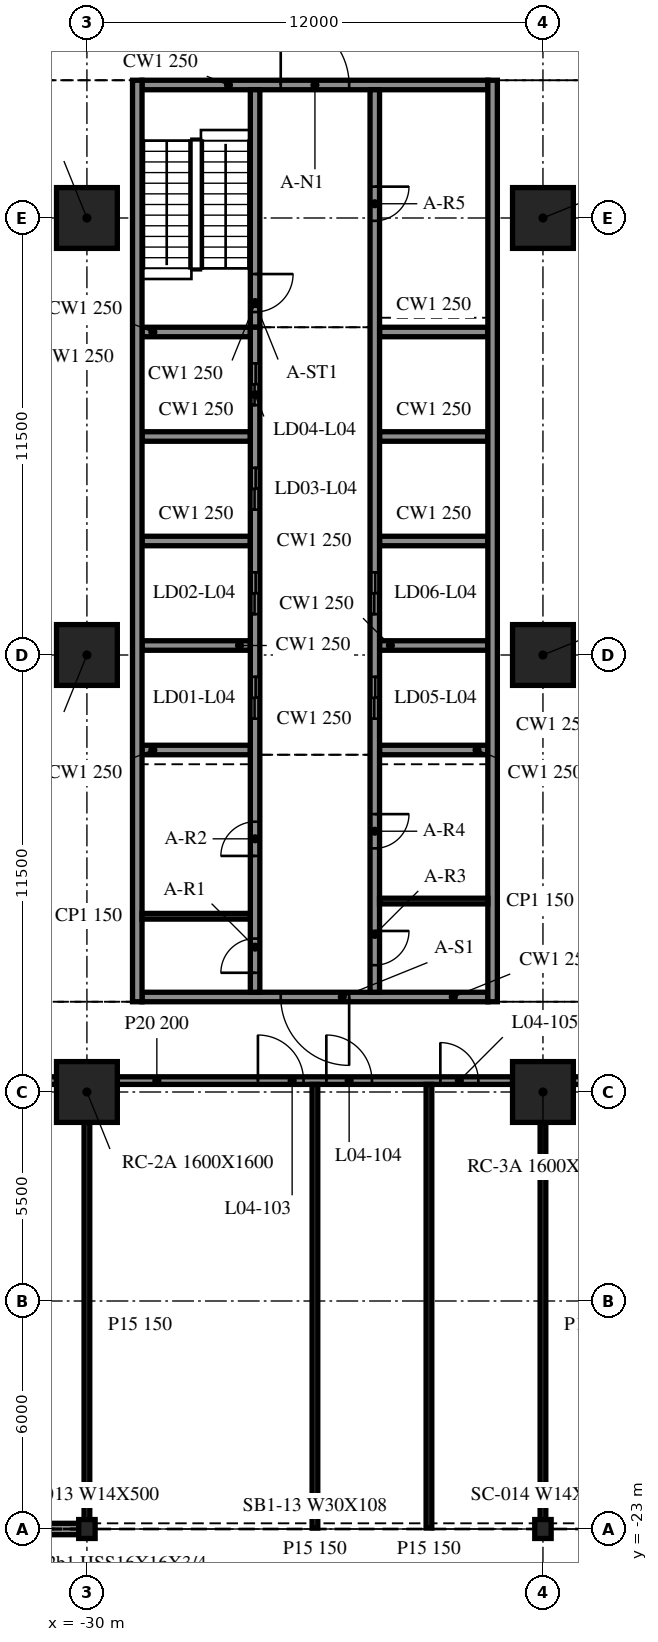
"""IFC4 building model, lengths in metres.
Left out: names, types, materials, properties, quantities, classifications, styles, units other than length and angle.
Written with IfcOpenShell. Run it as: python <this file> out.ifc"""

import sys

from ifc_helpers import new_model, si_unit, direction, frame, frame_2d, origin, origin_2d, place, context, subcontext, project, spatial, rectangle, i_section, extrude, element, fill, save


model = new_model("IFC4")
c1 = context("Model", 3, precision=1e-05, world=origin(), true_north=direction((0.0, 1.0)))
c2 = subcontext(c1, "Body", "Model", "MODEL_VIEW")
j1 = project(units=[si_unit("LENGTHUNIT", "METRE"), si_unit("PLANEANGLEUNIT", "RADIAN")], contexts=[c1])
p1 = place(None, origin())
s1 = spatial("IfcSite", under=j1, at=p1, CompositionType="ELEMENT")
p2 = place(p1, origin())
s2 = spatial("IfcBuilding", under=s1, at=p2, CompositionType="ELEMENT")
p3 = place(p2, frame((0.0, 0.0, 20.1)))
s3 = spatial("IfcBuildingStorey", under=s2, at=p3, CompositionType="ELEMENT", Elevation=20.1)
for number, where, z_axis, x_axis in (
    (1, (-30.0, -11.5, -0.34), (0.0, 0.0, 1.0), (1.0, 0.0, 0.0)),
    (2, (-30.0, 0.0, -0.34), (0.0, 0.0, 1.0), (1.0, 0.0, 0.0)),
    (3, (-30.0, 11.5, -0.34), (0.0, 0.0, 1.0), (1.0, 0.0, 0.0)),
    (4, (-18.0, -11.5, -0.34), (0.0, 0.0, 1.0), (1.0, 0.0, 0.0)),
    (5, (-18.0, 0.0, -0.34), (0.0, 0.0, 1.0), (1.0, 0.0, 0.0)),
    (6, (-18.0, 11.5, -0.34), (0.0, 0.0, 1.0), (1.0, 0.0, 0.0)),
):
    element("IfcColumn", number, at=place(p3, frame(where, z_axis=z_axis, x_axis=x_axis)), inside=s3, PredefinedType="COLUMN", context=c2, shape_type="SweptSolid", body=[
        extrude(rectangle(XDim=1.6, YDim=1.6, at=origin_2d()), origin(), (0.0, 0.0, 1.0), 4.3),
    ])
for number, where, z_axis, x_axis in (
    (7, (-30.0, -23.0, -0.34), (0.0, 0.0, 1.0), (1.0, 0.0, 0.0)),
    (8, (-18.0, -23.0, -0.34), (0.0, 0.0, 1.0), (1.0, 0.0, 0.0)),
):
    element("IfcColumn", number, at=place(p3, frame(where, z_axis=z_axis, x_axis=x_axis)), inside=s3, PredefinedType="COLUMN", context=c2, shape_type="SweptSolid", body=[
        extrude(i_section(OverallWidth=0.432, OverallDepth=0.498, WebThickness=0.056, FlangeThickness=0.089, at=origin_2d()), origin(), (0.0, 0.0, 1.0), 4.3),
    ])
p4 = place(p3, frame((-41.972, -23.0, 0.0), z_axis=(0.0, 0.0, 1.0), x_axis=(1.0, 0.0, 0.0)))
e9 = element("IfcWall", 9, at=p4, inside=s3, PredefinedType="NOTDEFINED", context=c2, shape_type="SweptSolid", body=[
    extrude(rectangle(XDim=11.944, YDim=0.3, at=frame_2d((5.972, 0.0))), origin(), (0.0, 0.0, 1.0), 3.203),
])
for number, where, z_axis, x_axis in (
    (10, (-28.675, 15.125, 0.0), (0.0, 0.0, 1.0), (0.0, -1.0, 0.0)),
    (11, (-19.325, -9.125, 0.0), (0.0, 0.0, 1.0), (0.0, 1.0, 0.0)),
):
    element("IfcWall", number, at=place(p3, frame(where, z_axis=z_axis, x_axis=x_axis)), inside=s3, PredefinedType="SOLIDWALL", context=c2, shape_type="SweptSolid", body=[
        extrude(rectangle(XDim=24.25, YDim=0.25, at=frame_2d((12.125, 0.0))), origin(), (0.0, 0.0, 1.0), 3.96),
    ])
p5 = place(p3, frame((-19.45, -9.0, 0.0), z_axis=(0.0, 0.0, 1.0), x_axis=(-1.0, 0.0, 0.0)))
e12 = element("IfcWall", 12, at=p5, inside=s3, PredefinedType="SOLIDWALL", context=c2, shape_type="SweptSolid", body=[
    extrude(rectangle(XDim=9.1, YDim=0.25, at=frame_2d((4.55, 0.0))), origin(), (0.0, 0.0, 1.0), 3.96),
])
p6 = place(p5, frame((3.65, 0.0, 0.0)))
e13 = element("IfcOpeningElement", 13, at=p6, cuts=e12, PredefinedType="OPENING", context=c2, shape_type="SweptSolid", body=[
    extrude(rectangle(XDim=1.8, YDim=2.1, at=frame_2d((0.9, 1.05))), frame((0.0, 0.135, 0.0), z_axis=(0.0, -1.0, 0.0), x_axis=(1.0, 0.0, 0.0)), (0.0, 0.0, 1.0), 0.27),
])
p7 = place(p3, frame((-28.55, 15.0, 0.0), z_axis=(0.0, 0.0, 1.0), x_axis=(1.0, 0.0, 0.0)))
e14 = element("IfcWall", 14, at=p7, inside=s3, PredefinedType="SOLIDWALL", context=c2, shape_type="SweptSolid", body=[
    extrude(rectangle(XDim=9.1, YDim=0.25, at=frame_2d((4.55, 0.0))), origin(), (0.0, 0.0, 1.0), 3.96),
])
p8 = place(p7, frame((3.65, 0.0, 0.0)))
e15 = element("IfcOpeningElement", 15, at=p8, cuts=e14, PredefinedType="OPENING", context=c2, shape_type="SweptSolid", body=[
    extrude(rectangle(XDim=1.8, YDim=2.1, at=frame_2d((0.9, 1.05))), frame((0.0, 0.135, 0.0), z_axis=(0.0, -1.0, 0.0), x_axis=(1.0, 0.0, 0.0)), (0.0, 0.0, 1.0), 0.27),
])
p9 = place(p3, frame((-25.575, -8.875, 0.0), z_axis=(0.0, 0.0, 1.0), x_axis=(0.0, 1.0, 0.0)))
e16 = element("IfcWall", 16, at=p9, inside=s3, PredefinedType="SOLIDWALL", context=c2, shape_type="SweptSolid", body=[
    extrude(rectangle(XDim=17.5, YDim=0.25, at=frame_2d((8.75, 0.0))), origin(), (0.0, 0.0, 1.0), 3.96),
])
p10 = place(p9, frame((7.2, 0.0, 0.0)))
e17 = element("IfcOpeningElement", 17, at=p10, cuts=e16, PredefinedType="OPENING", context=c2, shape_type="SweptSolid", body=[
    extrude(rectangle(XDim=1.1, YDim=2.1, at=frame_2d((0.55, 1.05))), frame((0.0, 0.135, 0.0), z_axis=(0.0, -1.0, 0.0), x_axis=(1.0, 0.0, 0.0)), (0.0, 0.0, 1.0), 0.27),
])
p11 = place(p9, frame((9.95, 0.0, 0.0)))
e18 = element("IfcOpeningElement", 18, at=p11, cuts=e16, PredefinedType="OPENING", context=c2, shape_type="SweptSolid", body=[
    extrude(rectangle(XDim=1.1, YDim=2.1, at=frame_2d((0.55, 1.05))), frame((0.0, 0.135, 0.0), z_axis=(0.0, -1.0, 0.0), x_axis=(1.0, 0.0, 0.0)), (0.0, 0.0, 1.0), 0.27),
])
p12 = place(p9, frame((12.7, 0.0, 0.0)))
e19 = element("IfcOpeningElement", 19, at=p12, cuts=e16, PredefinedType="OPENING", context=c2, shape_type="SweptSolid", body=[
    extrude(rectangle(XDim=1.1, YDim=2.1, at=frame_2d((0.55, 1.05))), frame((0.0, 0.135, 0.0), z_axis=(0.0, -1.0, 0.0), x_axis=(1.0, 0.0, 0.0)), (0.0, 0.0, 1.0), 0.27),
])
p13 = place(p9, frame((15.45, 0.0, 0.0)))
e20 = element("IfcOpeningElement", 20, at=p13, cuts=e16, PredefinedType="OPENING", context=c2, shape_type="SweptSolid", body=[
    extrude(rectangle(XDim=1.1, YDim=2.1, at=frame_2d((0.55, 1.05))), frame((0.0, 0.135, 0.0), z_axis=(0.0, -1.0, 0.0), x_axis=(1.0, 0.0, 0.0)), (0.0, 0.0, 1.0), 0.27),
])
p14 = place(p9, frame((0.512, 0.0, 0.0)))
e21 = element("IfcOpeningElement", 21, at=p14, cuts=e16, PredefinedType="OPENING", context=c2, shape_type="SweptSolid", body=[
    extrude(rectangle(XDim=0.9, YDim=2.1, at=frame_2d((0.45, 1.05))), frame((0.0, 0.135, 0.0), z_axis=(0.0, -1.0, 0.0), x_axis=(1.0, 0.0, 0.0)), (0.0, 0.0, 1.0), 0.27),
])
p15 = place(p9, frame((3.587, 0.0, 0.0)))
e22 = element("IfcOpeningElement", 22, at=p15, cuts=e16, PredefinedType="OPENING", context=c2, shape_type="SweptSolid", body=[
    extrude(rectangle(XDim=0.9, YDim=2.1, at=frame_2d((0.45, 1.05))), frame((0.0, 0.135, 0.0), z_axis=(0.0, -1.0, 0.0), x_axis=(1.0, 0.0, 0.0)), (0.0, 0.0, 1.0), 0.27),
])
p16 = place(p3, frame((-25.575, 14.875, 0.0), z_axis=(0.0, 0.0, 1.0), x_axis=(0.0, -1.0, 0.0)))
e23 = element("IfcWall", 23, at=p16, inside=s3, PredefinedType="SOLIDWALL", context=c2, shape_type="SweptSolid", body=[
    extrude(rectangle(XDim=6.25, YDim=0.25, at=frame_2d((3.125, 0.0))), origin(), (0.0, 0.0, 1.0), 3.96),
])
p17 = place(p16, frame((4.85, 0.0, 0.0)))
e24 = element("IfcOpeningElement", 24, at=p17, cuts=e23, PredefinedType="OPENING", context=c2, shape_type="SweptSolid", body=[
    extrude(rectangle(XDim=1.0, YDim=2.1, at=frame_2d((0.5, 1.05))), frame((0.0, 0.135, 0.0), z_axis=(0.0, -1.0, 0.0), x_axis=(1.0, 0.0, 0.0)), (0.0, 0.0, 1.0), 0.27),
])
p18 = place(p3, frame((-22.425, 14.875, 0.0), z_axis=(0.0, 0.0, 1.0), x_axis=(0.0, -1.0, 0.0)))
e25 = element("IfcWall", 25, at=p18, inside=s3, PredefinedType="SOLIDWALL", context=c2, shape_type="SweptSolid", body=[
    extrude(rectangle(XDim=23.75, YDim=0.25, at=frame_2d((11.875, 0.0))), origin(), (0.0, 0.0, 1.0), 3.96),
])
p19 = place(p18, frame((15.45, 0.0, 0.0)))
e26 = element("IfcOpeningElement", 26, at=p19, cuts=e25, PredefinedType="OPENING", context=c2, shape_type="SweptSolid", body=[
    extrude(rectangle(XDim=1.1, YDim=2.1, at=frame_2d((0.55, 1.05))), frame((0.0, 0.135, 0.0), z_axis=(0.0, -1.0, 0.0), x_axis=(1.0, 0.0, 0.0)), (0.0, 0.0, 1.0), 0.27),
])
p20 = place(p18, frame((12.7, 0.0, 0.0)))
e27 = element("IfcOpeningElement", 27, at=p20, cuts=e25, PredefinedType="OPENING", context=c2, shape_type="SweptSolid", body=[
    extrude(rectangle(XDim=1.1, YDim=2.1, at=frame_2d((0.55, 1.05))), frame((0.0, 0.135, 0.0), z_axis=(0.0, -1.0, 0.0), x_axis=(1.0, 0.0, 0.0)), (0.0, 0.0, 1.0), 0.27),
])
p21 = place(p18, frame((22.137, 0.0, 0.0)))
e28 = element("IfcOpeningElement", 28, at=p21, cuts=e25, PredefinedType="OPENING", context=c2, shape_type="SweptSolid", body=[
    extrude(rectangle(XDim=0.9, YDim=2.1, at=frame_2d((0.45, 1.05))), frame((0.0, 0.135, 0.0), z_axis=(0.0, -1.0, 0.0), x_axis=(1.0, 0.0, 0.0)), (0.0, 0.0, 1.0), 0.27),
])
p22 = place(p18, frame((19.062, 0.0, 0.0)))
e29 = element("IfcOpeningElement", 29, at=p22, cuts=e25, PredefinedType="OPENING", context=c2, shape_type="SweptSolid", body=[
    extrude(rectangle(XDim=0.9, YDim=2.1, at=frame_2d((0.45, 1.05))), frame((0.0, 0.135, 0.0), z_axis=(0.0, -1.0, 0.0), x_axis=(1.0, 0.0, 0.0)), (0.0, 0.0, 1.0), 0.27),
])
p23 = place(p18, frame((2.55, 0.0, 0.0)))
e30 = element("IfcOpeningElement", 30, at=p23, cuts=e25, PredefinedType="OPENING", context=c2, shape_type="SweptSolid", body=[
    extrude(rectangle(XDim=0.9, YDim=2.1, at=frame_2d((0.45, 1.05))), frame((0.0, 0.135, 0.0), z_axis=(0.0, -1.0, 0.0), x_axis=(1.0, 0.0, 0.0)), (0.0, 0.0, 1.0), 0.27),
])
for number, where, z_axis, x_axis in (
    (31, (-28.55, -2.5, 0.0), (0.0, 0.0, 1.0), (1.0, 0.0, 0.0)),
    (32, (-28.55, 0.25, 0.0), (0.0, 0.0, 1.0), (1.0, 0.0, 0.0)),
    (33, (-28.55, 3.0, 0.0), (0.0, 0.0, 1.0), (1.0, 0.0, 0.0)),
    (34, (-28.55, 5.75, 0.0), (0.0, 0.0, 1.0), (1.0, 0.0, 0.0)),
    (35, (-28.55, 8.5, 0.0), (0.0, 0.0, 1.0), (1.0, 0.0, 0.0)),
    (36, (-22.3, -2.5, 0.0), (0.0, 0.0, 1.0), (1.0, 0.0, 0.0)),
    (37, (-22.3, 0.25, 0.0), (0.0, 0.0, 1.0), (1.0, 0.0, 0.0)),
    (38, (-22.3, 3.0, 0.0), (0.0, 0.0, 1.0), (1.0, 0.0, 0.0)),
    (39, (-22.3, 5.75, 0.0), (0.0, 0.0, 1.0), (1.0, 0.0, 0.0)),
    (40, (-22.3, 8.5, 0.0), (0.0, 0.0, 1.0), (1.0, 0.0, 0.0)),
):
    element("IfcWall", number, at=place(p3, frame(where, z_axis=z_axis, x_axis=x_axis)), inside=s3, PredefinedType="SOLIDWALL", context=c2, shape_type="SweptSolid", body=[
        extrude(rectangle(XDim=2.85, YDim=0.25, at=frame_2d((1.425, 0.0))), origin(), (0.0, 0.0, 1.0), 3.96),
    ])
for number, where, z_axis, x_axis in (
    (41, (-28.55, -6.875, 0.0), (0.0, 0.0, 1.0), (1.0, 0.0, 0.0)),
    (42, (-22.3, -6.475, 0.0), (0.0, 0.0, 1.0), (1.0, 0.0, 0.0)),
):
    element("IfcWall", number, at=place(p3, frame(where, z_axis=z_axis, x_axis=x_axis)), inside=s3, PredefinedType="PARTITIONING", context=c2, shape_type="SweptSolid", body=[
        extrude(rectangle(XDim=2.85, YDim=0.15, at=frame_2d((1.425, 0.0))), origin(), (0.0, 0.0, 1.0), 3.96),
    ])
p24 = place(p3, frame((-41.2, -11.2, 0.0), z_axis=(0.0, 0.0, 1.0), x_axis=(1.0, 0.0, 0.0)))
e43 = element("IfcWall", 43, at=p24, inside=s3, PredefinedType="PARTITIONING", context=c2, shape_type="SweptSolid", body=[
    extrude(rectangle(XDim=10.4, YDim=0.2, at=frame_2d((5.2, 0.0))), origin(), (0.0, 0.0, 1.0), 3.96),
])
p25 = place(p24, frame((5.5, 0.0, 0.0)))
e44 = element("IfcOpeningElement", 44, at=p25, cuts=e43, PredefinedType="OPENING", context=c2, shape_type="SweptSolid", body=[
    extrude(rectangle(XDim=1.2, YDim=2.1, at=frame_2d((0.6, 1.05))), frame((0.0, 0.11, 0.0), z_axis=(0.0, -1.0, 0.0), x_axis=(1.0, 0.0, 0.0)), (0.0, 0.0, 1.0), 0.22),
])
p26 = place(p3, frame((-29.2, -11.2, 0.0), z_axis=(0.0, 0.0, 1.0), x_axis=(1.0, 0.0, 0.0)))
e45 = element("IfcWall", 45, at=p26, inside=s3, PredefinedType="PARTITIONING", context=c2, shape_type="SweptSolid", body=[
    extrude(rectangle(XDim=10.4, YDim=0.2, at=frame_2d((5.2, 0.0))), origin(), (0.0, 0.0, 1.0), 3.96),
])
p27 = place(p26, frame((3.7, 0.0, 0.0)))
e46 = element("IfcOpeningElement", 46, at=p27, cuts=e45, PredefinedType="OPENING", context=c2, shape_type="SweptSolid", body=[
    extrude(rectangle(XDim=1.2, YDim=2.1, at=frame_2d((0.6, 1.05))), frame((0.0, 0.11, 0.0), z_axis=(0.0, -1.0, 0.0), x_axis=(1.0, 0.0, 0.0)), (0.0, 0.0, 1.0), 0.22),
])
p28 = place(p26, frame((5.5, 0.0, 0.0)))
e47 = element("IfcOpeningElement", 47, at=p28, cuts=e45, PredefinedType="OPENING", context=c2, shape_type="SweptSolid", body=[
    extrude(rectangle(XDim=1.2, YDim=2.1, at=frame_2d((0.6, 1.05))), frame((0.0, 0.11, 0.0), z_axis=(0.0, -1.0, 0.0), x_axis=(1.0, 0.0, 0.0)), (0.0, 0.0, 1.0), 0.22),
])
p29 = place(p26, frame((8.5, 0.0, 0.0)))
e48 = element("IfcOpeningElement", 48, at=p29, cuts=e45, PredefinedType="OPENING", context=c2, shape_type="SweptSolid", body=[
    extrude(rectangle(XDim=1.0, YDim=2.1, at=frame_2d((0.5, 1.05))), frame((0.0, 0.11, 0.0), z_axis=(0.0, -1.0, 0.0), x_axis=(1.0, 0.0, 0.0)), (0.0, 0.0, 1.0), 0.22),
])
p30 = place(p3, frame((-17.2, -11.2, 0.0), z_axis=(0.0, 0.0, 1.0), x_axis=(1.0, 0.0, 0.0)))
e49 = element("IfcWall", 49, at=p30, inside=s3, PredefinedType="PARTITIONING", context=c2, shape_type="SweptSolid", body=[
    extrude(rectangle(XDim=10.4, YDim=0.2, at=frame_2d((5.2, 0.0))), origin(), (0.0, 0.0, 1.0), 3.96),
])
p31 = place(p30, frame((3.7, 0.0, 0.0)))
e50 = element("IfcOpeningElement", 50, at=p31, cuts=e49, PredefinedType="OPENING", context=c2, shape_type="SweptSolid", body=[
    extrude(rectangle(XDim=1.2, YDim=2.1, at=frame_2d((0.6, 1.05))), frame((0.0, 0.11, 0.0), z_axis=(0.0, -1.0, 0.0), x_axis=(1.0, 0.0, 0.0)), (0.0, 0.0, 1.0), 0.22),
])
p32 = place(p30, frame((5.5, 0.0, 0.0)))
e51 = element("IfcOpeningElement", 51, at=p32, cuts=e49, PredefinedType="OPENING", context=c2, shape_type="SweptSolid", body=[
    extrude(rectangle(XDim=1.2, YDim=2.1, at=frame_2d((0.6, 1.05))), frame((0.0, 0.11, 0.0), z_axis=(0.0, -1.0, 0.0), x_axis=(1.0, 0.0, 0.0)), (0.0, 0.0, 1.0), 0.22),
])
p33 = place(p3, frame((-30.0, -22.975, 0.0), z_axis=(0.0, 0.0, 1.0), x_axis=(0.0, 1.0, 0.0)))
e52 = element("IfcWall", 52, at=p33, inside=s3, PredefinedType="PARTITIONING", context=c2, shape_type="SweptSolid", body=[
    extrude(rectangle(XDim=10.675, YDim=0.15, at=frame_2d((5.337, 0.0))), origin(), (0.0, 0.0, 1.0), 3.96),
])
for number, where, z_axis, x_axis in (
    (53, (-24.0, -22.975, 0.0), (0.0, 0.0, 1.0), (0.0, 1.0, 0.0)),
    (54, (-21.0, -22.975, 0.0), (0.0, 0.0, 1.0), (0.0, 1.0, 0.0)),
):
    element("IfcWall", number, at=place(p3, frame(where, z_axis=z_axis, x_axis=x_axis)), inside=s3, PredefinedType="PARTITIONING", context=c2, shape_type="SweptSolid", body=[
        extrude(rectangle(XDim=11.675, YDim=0.15, at=frame_2d((5.837, 0.0))), origin(), (0.0, 0.0, 1.0), 3.96),
    ])
p34 = place(p3, frame((-18.0, -22.975, 0.0), z_axis=(0.0, 0.0, 1.0), x_axis=(0.0, 1.0, 0.0)))
e55 = element("IfcWall", 55, at=p34, inside=s3, PredefinedType="PARTITIONING", context=c2, shape_type="SweptSolid", body=[
    extrude(rectangle(XDim=10.675, YDim=0.15, at=frame_2d((5.337, 0.0))), origin(), (0.0, 0.0, 1.0), 3.96),
])
p35 = place(p6, origin())
e56 = element("IfcDoor", 56, at=p35, inside=s3, OperationType="DOUBLE_DOOR_SINGLE_SWING", PredefinedType="DOOR", context=c2, shape_type="SweptSolid", body=[
    extrude(rectangle(XDim=1.8, YDim=2.1, at=frame_2d((0.9, 1.05))), frame((0.0, 0.025, 0.0), z_axis=(0.0, -1.0, 0.0), x_axis=(1.0, 0.0, 0.0)), (0.0, 0.0, 1.0), 0.05),
])
fill(e13, e56)
p36 = place(p8, origin())
e57 = element("IfcDoor", 57, at=p36, inside=s3, OperationType="DOUBLE_DOOR_SINGLE_SWING", PredefinedType="DOOR", context=c2, shape_type="SweptSolid", body=[
    extrude(rectangle(XDim=1.8, YDim=2.1, at=frame_2d((0.9, 1.05))), frame((0.0, 0.025, 0.0), z_axis=(0.0, -1.0, 0.0), x_axis=(1.0, 0.0, 0.0)), (0.0, 0.0, 1.0), 0.05),
])
fill(e15, e57)
p37 = place(p19, origin())
e58 = element("IfcDoor", 58, at=p37, inside=s3, OperationType="DOUBLE_DOOR_SLIDING", PredefinedType="DOOR", context=c2, shape_type="SweptSolid", body=[
    extrude(rectangle(XDim=1.1, YDim=2.1, at=frame_2d((0.55, 1.05))), frame((0.0, 0.025, 0.0), z_axis=(0.0, -1.0, 0.0), x_axis=(1.0, 0.0, 0.0)), (0.0, 0.0, 1.0), 0.05),
])
fill(e26, e58)
p38 = place(p20, origin())
e59 = element("IfcDoor", 59, at=p38, inside=s3, OperationType="DOUBLE_DOOR_SLIDING", PredefinedType="DOOR", context=c2, shape_type="SweptSolid", body=[
    extrude(rectangle(XDim=1.1, YDim=2.1, at=frame_2d((0.55, 1.05))), frame((0.0, 0.025, 0.0), z_axis=(0.0, -1.0, 0.0), x_axis=(1.0, 0.0, 0.0)), (0.0, 0.0, 1.0), 0.05),
])
fill(e27, e59)
p39 = place(p10, origin())
e60 = element("IfcDoor", 60, at=p39, inside=s3, OperationType="DOUBLE_DOOR_SLIDING", PredefinedType="DOOR", context=c2, shape_type="SweptSolid", body=[
    extrude(rectangle(XDim=1.1, YDim=2.1, at=frame_2d((0.55, 1.05))), frame((0.0, 0.025, 0.0), z_axis=(0.0, -1.0, 0.0), x_axis=(1.0, 0.0, 0.0)), (0.0, 0.0, 1.0), 0.05),
])
fill(e17, e60)
p40 = place(p11, origin())
e61 = element("IfcDoor", 61, at=p40, inside=s3, OperationType="DOUBLE_DOOR_SLIDING", PredefinedType="DOOR", context=c2, shape_type="SweptSolid", body=[
    extrude(rectangle(XDim=1.1, YDim=2.1, at=frame_2d((0.55, 1.05))), frame((0.0, 0.025, 0.0), z_axis=(0.0, -1.0, 0.0), x_axis=(1.0, 0.0, 0.0)), (0.0, 0.0, 1.0), 0.05),
])
fill(e18, e61)
p41 = place(p12, origin())
e62 = element("IfcDoor", 62, at=p41, inside=s3, OperationType="DOUBLE_DOOR_SLIDING", PredefinedType="DOOR", context=c2, shape_type="SweptSolid", body=[
    extrude(rectangle(XDim=1.1, YDim=2.1, at=frame_2d((0.55, 1.05))), frame((0.0, 0.025, 0.0), z_axis=(0.0, -1.0, 0.0), x_axis=(1.0, 0.0, 0.0)), (0.0, 0.0, 1.0), 0.05),
])
fill(e19, e62)
p42 = place(p13, origin())
e63 = element("IfcDoor", 63, at=p42, inside=s3, OperationType="DOUBLE_DOOR_SLIDING", PredefinedType="DOOR", context=c2, shape_type="SweptSolid", body=[
    extrude(rectangle(XDim=1.1, YDim=2.1, at=frame_2d((0.55, 1.05))), frame((0.0, 0.025, 0.0), z_axis=(0.0, -1.0, 0.0), x_axis=(1.0, 0.0, 0.0)), (0.0, 0.0, 1.0), 0.05),
])
fill(e20, e63)
p43 = place(p14, origin())
e64 = element("IfcDoor", 64, at=p43, inside=s3, OperationType="SINGLE_SWING_LEFT", PredefinedType="DOOR", context=c2, shape_type="SweptSolid", body=[
    extrude(rectangle(XDim=0.9, YDim=2.1, at=frame_2d((0.45, 1.05))), frame((0.0, 0.025, 0.0), z_axis=(0.0, -1.0, 0.0), x_axis=(1.0, 0.0, 0.0)), (0.0, 0.0, 1.0), 0.05),
])
fill(e21, e64)
p44 = place(p15, origin())
e65 = element("IfcDoor", 65, at=p44, inside=s3, OperationType="SINGLE_SWING_RIGHT", PredefinedType="DOOR", context=c2, shape_type="SweptSolid", body=[
    extrude(rectangle(XDim=0.9, YDim=2.1, at=frame_2d((0.45, 1.05))), frame((0.0, 0.025, 0.0), z_axis=(0.0, -1.0, 0.0), x_axis=(1.0, 0.0, 0.0)), (0.0, 0.0, 1.0), 0.05),
])
fill(e22, e65)
p45 = place(p21, origin())
e66 = element("IfcDoor", 66, at=p45, inside=s3, OperationType="SINGLE_SWING_LEFT", PredefinedType="DOOR", context=c2, shape_type="SweptSolid", body=[
    extrude(rectangle(XDim=0.9, YDim=2.1, at=frame_2d((0.45, 1.05))), frame((0.0, 0.025, 0.0), z_axis=(0.0, -1.0, 0.0), x_axis=(1.0, 0.0, 0.0)), (0.0, 0.0, 1.0), 0.05),
])
fill(e28, e66)
p46 = place(p22, origin())
e67 = element("IfcDoor", 67, at=p46, inside=s3, OperationType="SINGLE_SWING_RIGHT", PredefinedType="DOOR", context=c2, shape_type="SweptSolid", body=[
    extrude(rectangle(XDim=0.9, YDim=2.1, at=frame_2d((0.45, 1.05))), frame((0.0, 0.025, 0.0), z_axis=(0.0, -1.0, 0.0), x_axis=(1.0, 0.0, 0.0)), (0.0, 0.0, 1.0), 0.05),
])
fill(e29, e67)
p47 = place(p23, origin())
e68 = element("IfcDoor", 68, at=p47, inside=s3, OperationType="SINGLE_SWING_LEFT", PredefinedType="DOOR", context=c2, shape_type="SweptSolid", body=[
    extrude(rectangle(XDim=0.9, YDim=2.1, at=frame_2d((0.45, 1.05))), frame((0.0, 0.025, 0.0), z_axis=(0.0, -1.0, 0.0), x_axis=(1.0, 0.0, 0.0)), (0.0, 0.0, 1.0), 0.05),
])
fill(e30, e68)
p48 = place(p17, origin())
e69 = element("IfcDoor", 69, at=p48, inside=s3, OperationType="SINGLE_SWING_RIGHT", PredefinedType="DOOR", context=c2, shape_type="SweptSolid", body=[
    extrude(rectangle(XDim=1.0, YDim=2.1, at=frame_2d((0.5, 1.05))), frame((0.0, 0.025, 0.0), z_axis=(0.0, -1.0, 0.0), x_axis=(1.0, 0.0, 0.0)), (0.0, 0.0, 1.0), 0.05),
])
fill(e24, e69)
p49 = place(p27, origin())
e70 = element("IfcDoor", 70, at=p49, inside=s3, OperationType="SINGLE_SWING_RIGHT", PredefinedType="DOOR", context=c2, shape_type="SweptSolid", body=[
    extrude(rectangle(XDim=1.2, YDim=2.1, at=frame_2d((0.6, 1.05))), frame((0.0, 0.025, 0.0), z_axis=(0.0, -1.0, 0.0), x_axis=(1.0, 0.0, 0.0)), (0.0, 0.0, 1.0), 0.05),
])
fill(e46, e70)
p50 = place(p28, origin())
e71 = element("IfcDoor", 71, at=p50, inside=s3, OperationType="SINGLE_SWING_LEFT", PredefinedType="DOOR", context=c2, shape_type="SweptSolid", body=[
    extrude(rectangle(XDim=1.2, YDim=2.1, at=frame_2d((0.6, 1.05))), frame((0.0, 0.025, 0.0), z_axis=(0.0, -1.0, 0.0), x_axis=(1.0, 0.0, 0.0)), (0.0, 0.0, 1.0), 0.05),
])
fill(e47, e71)
p51 = place(p29, origin())
e72 = element("IfcDoor", 72, at=p51, inside=s3, OperationType="SINGLE_SWING_LEFT", PredefinedType="DOOR", context=c2, shape_type="SweptSolid", body=[
    extrude(rectangle(XDim=1.0, YDim=2.1, at=frame_2d((0.5, 1.05))), frame((0.0, 0.025, 0.0), z_axis=(0.0, -1.0, 0.0), x_axis=(1.0, 0.0, 0.0)), (0.0, 0.0, 1.0), 0.05),
])
fill(e48, e72)
save(model, sys.argv[1])
